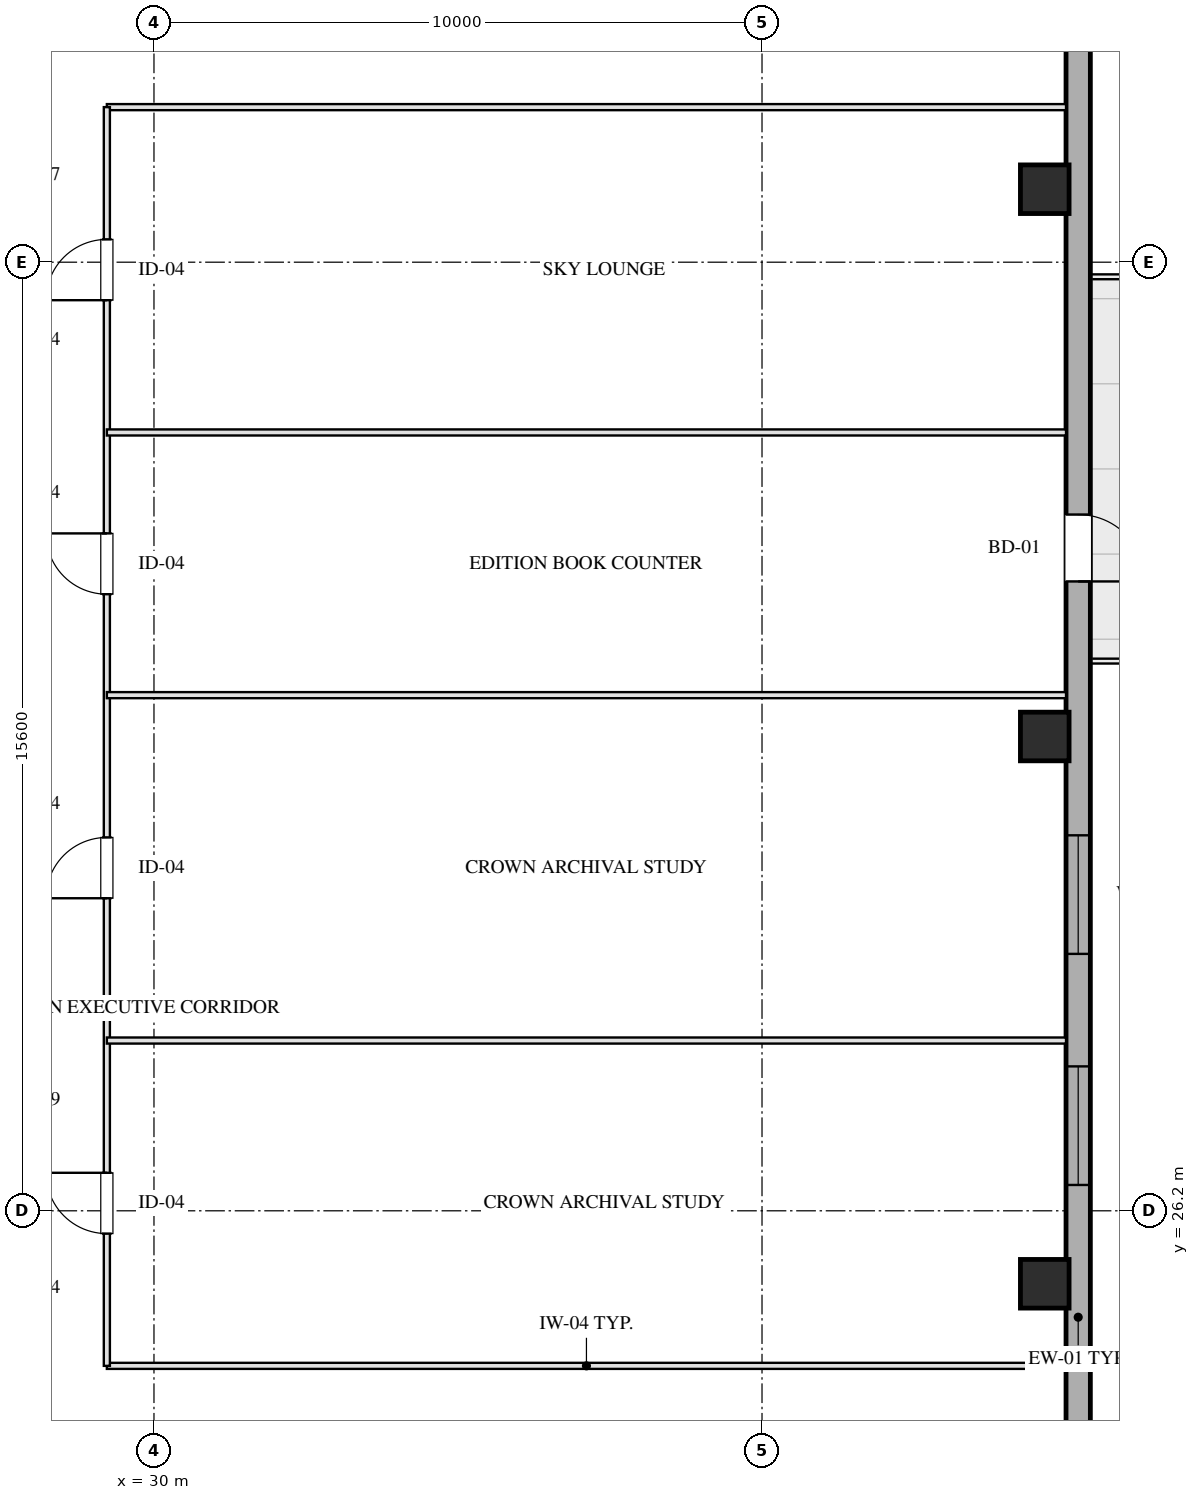
"""IFC4 building model, lengths in metres.
Left out: names, types, materials, properties, quantities, classifications, styles, units other than length and angle.
Written with IfcOpenShell. Run it as: python <this file> out.ifc"""

import sys

from ifc_helpers import new_model, si_unit, direction, frame, frame_2d, origin, origin_2d, place, context, subcontext, project, spatial, rectangle, hollow_rectangle, extrude, element, fill, save


model = new_model("IFC4")
c1 = context("Model", 3, precision=1e-05, world=origin(), true_north=direction((0.0, 1.0)))
c2 = subcontext(c1, "Body", "Model", "MODEL_VIEW")
j1 = project(units=[si_unit("LENGTHUNIT", "METRE"), si_unit("PLANEANGLEUNIT", "RADIAN")], contexts=[c1])
p1 = place(None, origin())
s1 = spatial("IfcSite", under=j1, at=p1, CompositionType="ELEMENT")
p2 = place(p1, origin())
s2 = spatial("IfcBuilding", under=s1, at=p2, CompositionType="ELEMENT")
p3 = place(p2, frame((0.0, 0.0, 260.0)))
s3 = spatial("IfcBuildingStorey", under=s2, at=p3, CompositionType="ELEMENT", Elevation=260.0)
for number, where, z_axis, x_axis in (
    (1, (44.65, 25.0, 0.0), (0.0, 0.0, 1.0), (1.0, 0.0, 0.0)),
    (2, (44.65, 34.0, 0.0), (0.0, 0.0, 1.0), (1.0, 0.0, 0.0)),
    (3, (44.65, 43.0, 0.0), (0.0, 0.0, 1.0), (1.0, 0.0, 0.0)),
):
    element("IfcColumn", number, at=place(p3, frame(where, z_axis=z_axis, x_axis=x_axis)), inside=s3, PredefinedType="COLUMN", context=c2, shape_type="SweptSolid", body=[
        extrude(hollow_rectangle(XDim=0.8, YDim=0.8, WallThickness=0.028, at=origin_2d()), origin(), (0.0, 0.0, 1.0), 3.201),
    ])
p4 = place(p3, frame((45.2, 54.9, 0.0), z_axis=(0.0, 0.0, 1.0), x_axis=(0.0, -1.0, 0.0)))
e4 = element("IfcWall", 4, at=p4, inside=s3, PredefinedType="SOLIDWALL", context=c2, shape_type="SweptSolid", body=[
    extrude(rectangle(XDim=41.8, YDim=0.4, at=frame_2d((20.9, 0.0))), origin(), (0.0, 0.0, 1.0), 2.36),
])
p5 = place(p4, frame((26.325, 0.0, 0.75)))
e5 = element("IfcOpeningElement", 5, at=p5, cuts=e4, PredefinedType="OPENING", context=c2, shape_type="SweptSolid", body=[
    extrude(rectangle(XDim=1.95, YDim=1.21, at=frame_2d((0.975, 0.605))), frame((0.0, 0.21, 0.0), z_axis=(0.0, -1.0, 0.0), x_axis=(1.0, 0.0, 0.0)), (0.0, 0.0, 1.0), 0.42),
])
p6 = place(p4, frame((22.525, 0.0, 0.75)))
e6 = element("IfcOpeningElement", 6, at=p6, cuts=e4, PredefinedType="OPENING", context=c2, shape_type="SweptSolid", body=[
    extrude(rectangle(XDim=1.95, YDim=1.21, at=frame_2d((0.975, 0.605))), frame((0.0, 0.21, 0.0), z_axis=(0.0, -1.0, 0.0), x_axis=(1.0, 0.0, 0.0)), (0.0, 0.0, 1.0), 0.42),
])
p7 = place(p4, frame((17.25, 0.0, 0.0)))
e7 = element("IfcOpeningElement", 7, at=p7, cuts=e4, PredefinedType="OPENING", context=c2, shape_type="SweptSolid", body=[
    extrude(rectangle(XDim=1.1, YDim=2.15, at=frame_2d((0.55, 1.075))), frame((0.0, 0.21, 0.0), z_axis=(0.0, -1.0, 0.0), x_axis=(1.0, 0.0, 0.0)), (0.0, 0.0, 1.0), 0.42),
])
for number, where, z_axis, x_axis in (
    (8, (29.225, 23.65, 0.0), (0.0, 0.0, 1.0), (1.0, 0.0, 0.0)),
    (9, (29.225, 44.35, 0.0), (0.0, 0.0, 1.0), (1.0, 0.0, 0.0)),
):
    element("IfcWall", number, at=place(p3, frame(where, z_axis=z_axis, x_axis=x_axis)), inside=s3, PredefinedType="MOVABLE", context=c2, shape_type="SweptSolid", body=[
        extrude(rectangle(XDim=15.775, YDim=0.1, at=frame_2d((7.887, 0.0))), origin(), (0.0, 0.0, 1.0), 2.925),
    ])
p8 = place(p3, frame((29.225, 23.65, 0.0), z_axis=(0.0, 0.0, 1.0), x_axis=(0.0, 1.0, 0.0)))
e10 = element("IfcWall", 10, at=p8, inside=s3, PredefinedType="MOVABLE", context=c2, shape_type="SweptSolid", body=[
    extrude(rectangle(XDim=20.7, YDim=0.1, at=frame_2d((10.35, 0.0))), origin(), (0.0, 0.0, 1.0), 2.925),
])
p9 = place(p8, frame((2.175, 0.0, 0.0)))
e11 = element("IfcOpeningElement", 11, at=p9, cuts=e10, PredefinedType="OPENING", context=c2, shape_type="SweptSolid", body=[
    extrude(rectangle(XDim=1.0, YDim=2.05, at=frame_2d((0.5, 1.025))), frame((0.0, 0.06, 0.0), z_axis=(0.0, -1.0, 0.0), x_axis=(1.0, 0.0, 0.0)), (0.0, 0.0, 1.0), 0.12),
])
p10 = place(p8, frame((7.69, 0.0, 0.0)))
e12 = element("IfcOpeningElement", 12, at=p10, cuts=e10, PredefinedType="OPENING", context=c2, shape_type="SweptSolid", body=[
    extrude(rectangle(XDim=1.0, YDim=2.05, at=frame_2d((0.5, 1.025))), frame((0.0, 0.06, 0.0), z_axis=(0.0, -1.0, 0.0), x_axis=(1.0, 0.0, 0.0)), (0.0, 0.0, 1.0), 0.12),
])
p11 = place(p8, frame((12.69, 0.0, 0.0)))
e13 = element("IfcOpeningElement", 13, at=p11, cuts=e10, PredefinedType="OPENING", context=c2, shape_type="SweptSolid", body=[
    extrude(rectangle(XDim=1.0, YDim=2.05, at=frame_2d((0.5, 1.025))), frame((0.0, 0.06, 0.0), z_axis=(0.0, -1.0, 0.0), x_axis=(1.0, 0.0, 0.0)), (0.0, 0.0, 1.0), 0.12),
])
p12 = place(p8, frame((17.525, 0.0, 0.0)))
e14 = element("IfcOpeningElement", 14, at=p12, cuts=e10, PredefinedType="OPENING", context=c2, shape_type="SweptSolid", body=[
    extrude(rectangle(XDim=1.0, YDim=2.05, at=frame_2d((0.5, 1.025))), frame((0.0, 0.06, 0.0), z_axis=(0.0, -1.0, 0.0), x_axis=(1.0, 0.0, 0.0)), (0.0, 0.0, 1.0), 0.12),
])
for number, where, z_axis, x_axis in (
    (15, (29.225, 29.0, 0.0), (0.0, 0.0, 1.0), (1.0, 0.0, 0.0)),
    (16, (29.225, 34.68, 0.0), (0.0, 0.0, 1.0), (1.0, 0.0, 0.0)),
    (17, (29.225, 39.0, 0.0), (0.0, 0.0, 1.0), (1.0, 0.0, 0.0)),
):
    element("IfcWall", number, at=place(p3, frame(where, z_axis=z_axis, x_axis=x_axis)), inside=s3, PredefinedType="MOVABLE", context=c2, shape_type="SweptSolid", body=[
        extrude(rectangle(XDim=15.775, YDim=0.1, at=frame_2d((7.887, 0.0))), origin(), (0.0, 0.0, 1.0), 2.925),
    ])
p13 = place(p5, origin())
e18 = element("IfcWindow", 18, at=p13, inside=s3, PartitioningType="TRIPLE_PANEL_VERTICAL", PredefinedType="WINDOW", context=c2, shape_type="SweptSolid", body=[
    extrude(rectangle(XDim=1.95, YDim=1.21, at=frame_2d((0.975, 0.605))), frame((0.0, 0.03, 0.0), z_axis=(0.0, -1.0, 0.0), x_axis=(1.0, 0.0, 0.0)), (0.0, 0.0, 1.0), 0.06),
])
fill(e5, e18)
p14 = place(p6, origin())
e19 = element("IfcWindow", 19, at=p14, inside=s3, PartitioningType="TRIPLE_PANEL_VERTICAL", PredefinedType="WINDOW", context=c2, shape_type="SweptSolid", body=[
    extrude(rectangle(XDim=1.95, YDim=1.21, at=frame_2d((0.975, 0.605))), frame((0.0, 0.03, 0.0), z_axis=(0.0, -1.0, 0.0), x_axis=(1.0, 0.0, 0.0)), (0.0, 0.0, 1.0), 0.06),
])
fill(e6, e19)
p15 = place(p7, origin())
e20 = element("IfcDoor", 20, at=p15, inside=s3, OperationType="SINGLE_SWING_RIGHT", PredefinedType="DOOR", context=c2, shape_type="SweptSolid", body=[
    extrude(rectangle(XDim=1.1, YDim=2.15, at=frame_2d((0.55, 1.075))), frame((0.0, 0.025, 0.0), z_axis=(0.0, -1.0, 0.0), x_axis=(1.0, 0.0, 0.0)), (0.0, 0.0, 1.0), 0.05),
])
fill(e7, e20)
p16 = place(p9, origin())
e21 = element("IfcDoor", 21, at=p16, inside=s3, OperationType="SINGLE_SWING_RIGHT", PredefinedType="DOOR", context=c2, shape_type="SweptSolid", body=[
    extrude(rectangle(XDim=1.0, YDim=2.05, at=frame_2d((0.5, 1.025))), frame((0.0, 0.025, 0.0), z_axis=(0.0, -1.0, 0.0), x_axis=(1.0, 0.0, 0.0)), (0.0, 0.0, 1.0), 0.05),
])
fill(e11, e21)
p17 = place(p10, origin())
e22 = element("IfcDoor", 22, at=p17, inside=s3, OperationType="SINGLE_SWING_LEFT", PredefinedType="DOOR", context=c2, shape_type="SweptSolid", body=[
    extrude(rectangle(XDim=1.0, YDim=2.05, at=frame_2d((0.5, 1.025))), frame((0.0, 0.025, 0.0), z_axis=(0.0, -1.0, 0.0), x_axis=(1.0, 0.0, 0.0)), (0.0, 0.0, 1.0), 0.05),
])
fill(e12, e22)
p18 = place(p11, origin())
e23 = element("IfcDoor", 23, at=p18, inside=s3, OperationType="SINGLE_SWING_RIGHT", PredefinedType="DOOR", context=c2, shape_type="SweptSolid", body=[
    extrude(rectangle(XDim=1.0, YDim=2.05, at=frame_2d((0.5, 1.025))), frame((0.0, 0.025, 0.0), z_axis=(0.0, -1.0, 0.0), x_axis=(1.0, 0.0, 0.0)), (0.0, 0.0, 1.0), 0.05),
])
fill(e13, e23)
p19 = place(p12, origin())
e24 = element("IfcDoor", 24, at=p19, inside=s3, OperationType="SINGLE_SWING_LEFT", PredefinedType="DOOR", context=c2, shape_type="SweptSolid", body=[
    extrude(rectangle(XDim=1.0, YDim=2.05, at=frame_2d((0.5, 1.025))), frame((0.0, 0.025, 0.0), z_axis=(0.0, -1.0, 0.0), x_axis=(1.0, 0.0, 0.0)), (0.0, 0.0, 1.0), 0.05),
])
fill(e14, e24)
save(model, sys.argv[1])
